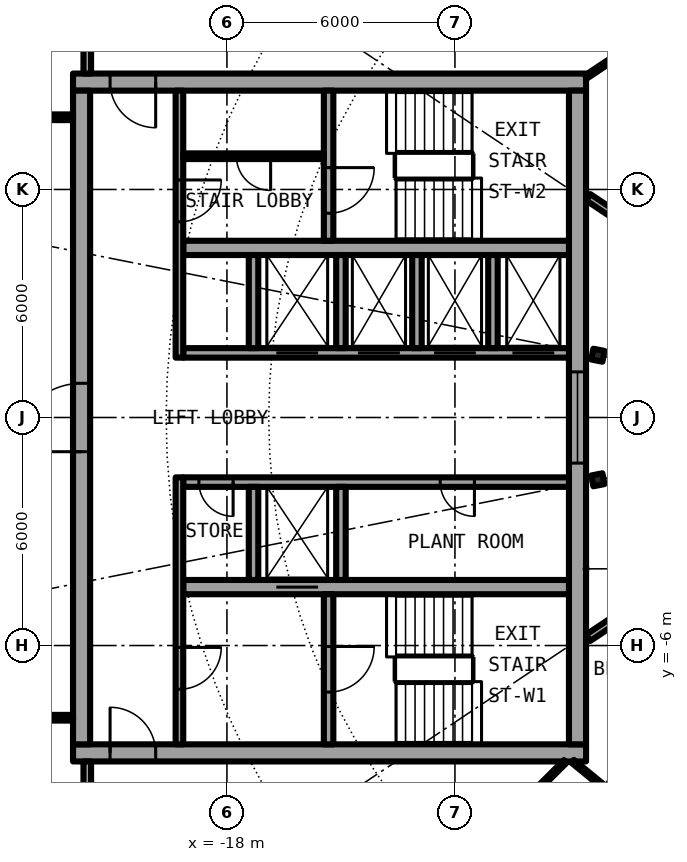
"""IFC4 building model, lengths in metres.
Left out: names, types, materials, properties, quantities, classifications, styles, units other than length and angle.
Written with IfcOpenShell. Run it as: python <this file> out.ifc"""

import sys

from ifc_helpers import new_model, si_unit, direction, frame, frame_2d, origin, origin_2d, place, context, subcontext, project, spatial, rectangle, i_section, extrude, element, fill, save


model = new_model("IFC4")
c1 = context("Model", 3, precision=1e-05, world=origin(), true_north=direction((0.0, 1.0)))
c2 = subcontext(c1, "Body", "Model", "MODEL_VIEW")
j1 = project(units=[si_unit("LENGTHUNIT", "METRE"), si_unit("PLANEANGLEUNIT", "RADIAN")], contexts=[c1])
p1 = place(None, origin())
s1 = spatial("IfcSite", under=j1, at=p1, CompositionType="ELEMENT")
p2 = place(p1, origin())
s2 = spatial("IfcBuilding", under=s1, at=p2, CompositionType="ELEMENT")
p3 = place(p2, frame((0.0, 0.0, 196.3)))
s3 = spatial("IfcBuildingStorey", under=s2, at=p3, CompositionType="ELEMENT", Elevation=196.3)
for number, where, z_axis, x_axis in (
    (1, (-8.239, 1.639, 0.0), (0.0, 0.0, 1.0), (-0.981, 0.195, 0.0)),
    (2, (-8.239, -1.639, 0.0), (0.0, 0.0, 1.0), (-0.981, -0.195, 0.0)),
):
    element("IfcColumn", number, at=place(p3, frame(where, z_axis=z_axis, x_axis=x_axis)), inside=s3, PredefinedType="COLUMN", context=c2, shape_type="SweptSolid", body=[
        extrude(i_section(OverallWidth=0.3, OverallDepth=0.29, WebThickness=0.009, FlangeThickness=0.014, FilletRadius=0.027, at=origin_2d()), origin(), (0.0, 0.0, 1.0), 3.05),
    ])
p4 = place(p3, frame((-22.05, -8.825, 0.0), z_axis=(0.0, 0.0, 1.0), x_axis=(1.0, 0.0, 0.0)))
e3 = element("IfcWall", 3, at=p4, inside=s3, PredefinedType="SHEAR", context=c2, shape_type="SweptSolid", body=[
    extrude(rectangle(XDim=13.5, YDim=0.45, at=frame_2d((6.75, 0.0))), origin(), (0.0, 0.0, 1.0), 3.05),
])
p5 = place(p4, frame((0.975, 0.0, 0.0)))
e4 = element("IfcOpeningElement", 4, at=p5, cuts=e3, PredefinedType="OPENING", context=c2, shape_type="SweptSolid", body=[
    extrude(rectangle(XDim=1.2, YDim=2.3, at=frame_2d((0.6, 1.15))), frame((0.0, 0.235, 0.0), z_axis=(0.0, -1.0, 0.0), x_axis=(1.0, 0.0, 0.0)), (0.0, 0.0, 1.0), 0.47),
])
p6 = place(p3, frame((-8.55, 8.825, 0.0), z_axis=(0.0, 0.0, 1.0), x_axis=(-1.0, 0.0, 0.0)))
e5 = element("IfcWall", 5, at=p6, inside=s3, PredefinedType="SHEAR", context=c2, shape_type="SweptSolid", body=[
    extrude(rectangle(XDim=13.5, YDim=0.45, at=frame_2d((6.75, 0.0))), origin(), (0.0, 0.0, 1.0), 3.05),
])
p7 = place(p6, frame((11.325, 0.0, 0.0)))
e6 = element("IfcOpeningElement", 6, at=p7, cuts=e5, PredefinedType="OPENING", context=c2, shape_type="SweptSolid", body=[
    extrude(rectangle(XDim=1.2, YDim=2.3, at=frame_2d((0.6, 1.15))), frame((0.0, 0.235, 0.0), z_axis=(0.0, -1.0, 0.0), x_axis=(1.0, 0.0, 0.0)), (0.0, 0.0, 1.0), 0.47),
])
p8 = place(p3, frame((-21.825, -8.6, 0.0), z_axis=(0.0, 0.0, 1.0), x_axis=(0.0, 1.0, 0.0)))
e7 = element("IfcWall", 7, at=p8, inside=s3, PredefinedType="SHEAR", context=c2, shape_type="SweptSolid", body=[
    extrude(rectangle(XDim=17.2, YDim=0.45, at=frame_2d((8.6, 0.0))), origin(), (0.0, 0.0, 1.0), 3.05),
])
p9 = place(p8, frame((7.7, 0.0, 0.0)))
e8 = element("IfcOpeningElement", 8, at=p9, cuts=e7, PredefinedType="OPENING", context=c2, shape_type="SweptSolid", body=[
    extrude(rectangle(XDim=1.8, YDim=2.3, at=frame_2d((0.9, 1.15))), frame((0.0, 0.235, 0.0), z_axis=(0.0, -1.0, 0.0), x_axis=(1.0, 0.0, 0.0)), (0.0, 0.0, 1.0), 0.47),
])
p10 = place(p3, frame((-8.775, 8.6, 0.0), z_axis=(0.0, 0.0, 1.0), x_axis=(0.0, -1.0, 0.0)))
e9 = element("IfcWall", 9, at=p10, inside=s3, PredefinedType="SHEAR", context=c2, shape_type="SweptSolid", body=[
    extrude(rectangle(XDim=17.2, YDim=0.45, at=frame_2d((8.6, 0.0))), origin(), (0.0, 0.0, 1.0), 3.05),
])
p11 = place(p10, frame((7.4, 0.0, 0.1)))
e10 = element("IfcOpeningElement", 10, at=p11, cuts=e9, PredefinedType="OPENING", context=c2, shape_type="SweptSolid", body=[
    extrude(rectangle(XDim=2.4, YDim=2.2, at=frame_2d((1.2, 1.1))), frame((0.0, 0.235, 0.0), z_axis=(0.0, -1.0, 0.0), x_axis=(1.0, 0.0, 0.0)), (0.0, 0.0, 1.0), 0.47),
])
p12 = place(p3, frame((-9.0, -1.7, 0.0), z_axis=(0.0, 0.0, 1.0), x_axis=(-1.0, 0.0, 0.0)))
e11 = element("IfcWall", 11, at=p12, inside=s3, PredefinedType="SHEAR", context=c2, shape_type="SweptSolid", body=[
    extrude(rectangle(XDim=10.15, YDim=0.25, at=frame_2d((5.075, 0.0))), origin(), (0.0, 0.0, 1.0), 3.05),
])
p13 = place(p12, frame((2.488, 0.0, 0.0)))
e12 = element("IfcOpeningElement", 12, at=p13, cuts=e11, PredefinedType="OPENING", context=c2, shape_type="SweptSolid", body=[
    extrude(rectangle(XDim=0.9, YDim=2.3, at=frame_2d((0.45, 1.15))), frame((0.0, 0.135, 0.0), z_axis=(0.0, -1.0, 0.0), x_axis=(1.0, 0.0, 0.0)), (0.0, 0.0, 1.0), 0.27),
])
p14 = place(p12, frame((8.837, 0.0, 0.0)))
e13 = element("IfcOpeningElement", 13, at=p14, cuts=e11, PredefinedType="OPENING", context=c2, shape_type="SweptSolid", body=[
    extrude(rectangle(XDim=0.9, YDim=2.3, at=frame_2d((0.45, 1.15))), frame((0.0, 0.135, 0.0), z_axis=(0.0, -1.0, 0.0), x_axis=(1.0, 0.0, 0.0)), (0.0, 0.0, 1.0), 0.27),
])
p15 = place(p3, frame((-9.0, -4.462, 0.0), z_axis=(0.0, 0.0, 1.0), x_axis=(-1.0, 0.0, 0.0)))
e14 = element("IfcWall", 14, at=p15, inside=s3, PredefinedType="SHEAR", context=c2, shape_type="SweptSolid", body=[
    extrude(rectangle(XDim=10.15, YDim=0.375, at=frame_2d((5.075, 0.0))), origin(), (0.0, 0.0, 1.0), 3.05),
])
p16 = place(p15, frame((6.6, 0.0, 0.0)))
e15 = element("IfcOpeningElement", 15, at=p16, cuts=e14, PredefinedType="OPENING", context=c2, shape_type="SweptSolid", body=[
    extrude(rectangle(XDim=1.1, YDim=2.3, at=frame_2d((0.55, 1.15))), frame((0.0, 0.198, 0.0), z_axis=(0.0, -1.0, 0.0), x_axis=(1.0, 0.0, 0.0)), (0.0, 0.0, 1.0), 0.395),
])
p17 = place(p3, frame((-15.325, -4.65, 0.0), z_axis=(0.0, 0.0, 1.0), x_axis=(0.0, -1.0, 0.0)))
e16 = element("IfcWall", 16, at=p17, inside=s3, PredefinedType="SHEAR", context=c2, shape_type="SweptSolid", body=[
    extrude(rectangle(XDim=3.95, YDim=0.25, at=frame_2d((1.975, 0.0))), origin(), (0.0, 0.0, 1.0), 3.05),
])
p18 = place(p17, frame((1.375, 0.0, 0.0)))
e17 = element("IfcOpeningElement", 17, at=p18, cuts=e16, PredefinedType="OPENING", context=c2, shape_type="SweptSolid", body=[
    extrude(rectangle(XDim=1.2, YDim=2.3, at=frame_2d((0.6, 1.15))), frame((0.0, 0.135, 0.0), z_axis=(0.0, -1.0, 0.0), x_axis=(1.0, 0.0, 0.0)), (0.0, 0.0, 1.0), 0.27),
])
for number, where, z_axis, x_axis in (
    (18, (-15.0, -1.825, 0.0), (0.0, 0.0, 1.0), (0.0, -1.0, 0.0)),
    (19, (-17.3, -1.825, 0.0), (0.0, 0.0, 1.0), (0.0, -1.0, 0.0)),
):
    element("IfcWall", number, at=place(p3, frame(where, z_axis=z_axis, x_axis=x_axis)), inside=s3, PredefinedType="SOLIDWALL", context=c2, shape_type="SweptSolid", body=[
        extrude(rectangle(XDim=2.45, YDim=0.25, at=frame_2d((1.225, 0.0))), origin(), (0.0, 0.0, 1.0), 2.7),
    ])
p19 = place(p3, frame((-19.25, -1.575, 0.0), z_axis=(0.0, 0.0, 1.0), x_axis=(0.0, -1.0, 0.0)))
e20 = element("IfcWall", 20, at=p19, inside=s3, PredefinedType="SOLIDWALL", context=c2, shape_type="SweptSolid", body=[
    extrude(rectangle(XDim=7.025, YDim=0.2, at=frame_2d((3.513, 0.0))), origin(), (0.0, 0.0, 1.0), 2.7),
])
p20 = place(p19, frame((4.475, 0.0, 0.0)))
e21 = element("IfcOpeningElement", 21, at=p20, cuts=e20, PredefinedType="OPENING", context=c2, shape_type="SweptSolid", body=[
    extrude(rectangle(XDim=1.1, YDim=2.3, at=frame_2d((0.55, 1.15))), frame((0.0, 0.11, 0.0), z_axis=(0.0, -1.0, 0.0), x_axis=(1.0, 0.0, 0.0)), (0.0, 0.0, 1.0), 0.22),
])
p21 = place(p3, frame((-9.0, 1.7, 0.0), z_axis=(0.0, 0.0, 1.0), x_axis=(-1.0, 0.0, 0.0)))
e22 = element("IfcWall", 22, at=p21, inside=s3, PredefinedType="SHEAR", context=c2, shape_type="SweptSolid", body=[
    extrude(rectangle(XDim=10.15, YDim=0.25, at=frame_2d((5.075, 0.0))), origin(), (0.0, 0.0, 1.0), 3.05),
])
p22 = place(p21, frame((0.387, 0.0, 0.0)))
e23 = element("IfcOpeningElement", 23, at=p22, cuts=e22, PredefinedType="OPENING", context=c2, shape_type="SweptSolid", body=[
    extrude(rectangle(XDim=1.1, YDim=2.3, at=frame_2d((0.55, 1.15))), frame((0.0, 0.135, 0.0), z_axis=(0.0, -1.0, 0.0), x_axis=(1.0, 0.0, 0.0)), (0.0, 0.0, 1.0), 0.27),
])
p23 = place(p21, frame((2.45, 0.0, 0.0)))
e24 = element("IfcOpeningElement", 24, at=p23, cuts=e22, PredefinedType="OPENING", context=c2, shape_type="SweptSolid", body=[
    extrude(rectangle(XDim=1.1, YDim=2.3, at=frame_2d((0.55, 1.15))), frame((0.0, 0.135, 0.0), z_axis=(0.0, -1.0, 0.0), x_axis=(1.0, 0.0, 0.0)), (0.0, 0.0, 1.0), 0.27),
])
p24 = place(p21, frame((4.45, 0.0, 0.0)))
e25 = element("IfcOpeningElement", 25, at=p24, cuts=e22, PredefinedType="OPENING", context=c2, shape_type="SweptSolid", body=[
    extrude(rectangle(XDim=1.1, YDim=2.3, at=frame_2d((0.55, 1.15))), frame((0.0, 0.135, 0.0), z_axis=(0.0, -1.0, 0.0), x_axis=(1.0, 0.0, 0.0)), (0.0, 0.0, 1.0), 0.27),
])
p25 = place(p21, frame((6.6, 0.0, 0.0)))
e26 = element("IfcOpeningElement", 26, at=p25, cuts=e22, PredefinedType="OPENING", context=c2, shape_type="SweptSolid", body=[
    extrude(rectangle(XDim=1.1, YDim=2.3, at=frame_2d((0.55, 1.15))), frame((0.0, 0.135, 0.0), z_axis=(0.0, -1.0, 0.0), x_axis=(1.0, 0.0, 0.0)), (0.0, 0.0, 1.0), 0.27),
])
p26 = place(p3, frame((-9.0, 4.462, 0.0), z_axis=(0.0, 0.0, 1.0), x_axis=(-1.0, 0.0, 0.0)))
e27 = element("IfcWall", 27, at=p26, inside=s3, PredefinedType="SHEAR", context=c2, shape_type="SweptSolid", body=[
    extrude(rectangle(XDim=10.15, YDim=0.375, at=frame_2d((5.075, 0.0))), origin(), (0.0, 0.0, 1.0), 3.05),
])
p27 = place(p3, frame((-15.325, 8.6, 0.0), z_axis=(0.0, 0.0, 1.0), x_axis=(0.0, -1.0, 0.0)))
e28 = element("IfcWall", 28, at=p27, inside=s3, PredefinedType="SHEAR", context=c2, shape_type="SweptSolid", body=[
    extrude(rectangle(XDim=3.95, YDim=0.25, at=frame_2d((1.975, 0.0))), origin(), (0.0, 0.0, 1.0), 3.05),
])
p28 = place(p27, frame((2.025, 0.0, 0.0)))
e29 = element("IfcOpeningElement", 29, at=p28, cuts=e28, PredefinedType="OPENING", context=c2, shape_type="SweptSolid", body=[
    extrude(rectangle(XDim=1.2, YDim=2.3, at=frame_2d((0.6, 1.15))), frame((0.0, 0.135, 0.0), z_axis=(0.0, -1.0, 0.0), x_axis=(1.0, 0.0, 0.0)), (0.0, 0.0, 1.0), 0.27),
])
for number, where, z_axis, x_axis in (
    (30, (-15.0, 1.825, 0.0), (0.0, 0.0, 1.0), (0.0, 1.0, 0.0)),
    (31, (-17.3, 1.825, 0.0), (0.0, 0.0, 1.0), (0.0, 1.0, 0.0)),
):
    element("IfcWall", number, at=place(p3, frame(where, z_axis=z_axis, x_axis=x_axis)), inside=s3, PredefinedType="SOLIDWALL", context=c2, shape_type="SweptSolid", body=[
        extrude(rectangle(XDim=2.45, YDim=0.25, at=frame_2d((1.225, 0.0))), origin(), (0.0, 0.0, 1.0), 2.7),
    ])
p29 = place(p3, frame((-19.25, 8.6, 0.0), z_axis=(0.0, 0.0, 1.0), x_axis=(0.0, -1.0, 0.0)))
e32 = element("IfcWall", 32, at=p29, inside=s3, PredefinedType="SOLIDWALL", context=c2, shape_type="SweptSolid", body=[
    extrude(rectangle(XDim=7.025, YDim=0.2, at=frame_2d((3.513, 0.0))), origin(), (0.0, 0.0, 1.0), 2.7),
])
p30 = place(p29, frame((2.35, 0.0, 0.0)))
e33 = element("IfcOpeningElement", 33, at=p30, cuts=e32, PredefinedType="OPENING", context=c2, shape_type="SweptSolid", body=[
    extrude(rectangle(XDim=1.1, YDim=2.3, at=frame_2d((0.55, 1.15))), frame((0.0, 0.11, 0.0), z_axis=(0.0, -1.0, 0.0), x_axis=(1.0, 0.0, 0.0)), (0.0, 0.0, 1.0), 0.22),
])
for number, where, z_axis, x_axis in (
    (34, (-11.0, 1.825, 0.0), (0.0, 0.0, 1.0), (0.0, 1.0, 0.0)),
    (35, (-13.0, 1.825, 0.0), (0.0, 0.0, 1.0), (0.0, 1.0, 0.0)),
):
    element("IfcWall", number, at=place(p3, frame(where, z_axis=z_axis, x_axis=x_axis)), inside=s3, PredefinedType="SOLIDWALL", context=c2, shape_type="SweptSolid", body=[
        extrude(rectangle(XDim=2.45, YDim=0.25, at=frame_2d((1.225, 0.0))), origin(), (0.0, 0.0, 1.0), 2.7),
    ])
p31 = place(p3, frame((-15.45, 6.875, 0.0), z_axis=(0.0, 0.0, 1.0), x_axis=(-1.0, 0.0, 0.0)))
e36 = element("IfcWall", 36, at=p31, inside=s3, PredefinedType="PARTITIONING", context=c2, shape_type="SweptSolid", body=[
    extrude(rectangle(XDim=3.7, YDim=0.15, at=frame_2d((1.85, 0.0))), origin(), (0.0, 0.0, 1.0), 2.7),
])
p32 = place(p31, frame((1.4, 0.0, 0.0)))
e37 = element("IfcOpeningElement", 37, at=p32, cuts=e36, PredefinedType="OPENING", context=c2, shape_type="SweptSolid", body=[
    extrude(rectangle(XDim=0.9, YDim=2.3, at=frame_2d((0.45, 1.15))), frame((0.0, 0.085, 0.0), z_axis=(0.0, -1.0, 0.0), x_axis=(1.0, 0.0, 0.0)), (0.0, 0.0, 1.0), 0.17),
])
for number, where, z_axis, x_axis in (
    (38, (-22.05, 7.9, 0.0), (0.0, 0.0, 1.0), (-1.0, 0.0, 0.0)),
    (39, (-22.05, -7.9, 0.0), (0.0, 0.0, 1.0), (-1.0, 0.0, 0.0)),
):
    element("IfcWall", number, at=place(p3, frame(where, z_axis=z_axis, x_axis=x_axis)), inside=s3, PredefinedType="PARTITIONING", context=c2, shape_type="SweptSolid", body=[
        extrude(rectangle(XDim=2.89, YDim=0.15, at=frame_2d((1.445, 0.0))), origin(), (0.0, 0.0, 1.0), 2.7),
    ])
p33 = place(p3, frame((-8.901, -9.047, 0.0), z_axis=(0.0, 0.0, 1.0), x_axis=(0.772786083133, -0.634666581534, 0.0)))
e40 = element("IfcWall", 40, at=p33, inside=s3, PredefinedType="PARTITIONING", context=c2, shape_type="SweptSolid", body=[
    extrude(rectangle(XDim=1.144, YDim=0.1, at=frame_2d((0.572, 0.0))), origin(), (0.0, 0.0, 1.0), 2.7),
])
p34 = place(p3, frame((-6.513, -4.472, 0.0), z_axis=(0.0, 0.0, 1.0), x_axis=(-0.831403409976, -0.555669299026, 0.0)))
e41 = element("IfcWall", 41, at=p34, inside=s3, PredefinedType="PARTITIONING", context=c2, shape_type="SweptSolid", body=[
    extrude(rectangle(XDim=2.383, YDim=0.2, at=frame_2d((1.191, 0.0))), origin(), (0.0, 0.0, 1.0), 2.7),
])
p35 = place(p3, frame((-12.069, -12.007, 0.0), z_axis=(0.0, 0.0, 1.0), x_axis=(0.708909651863, 0.705299302067, 0.0)))
e42 = element("IfcWall", 42, at=p35, inside=s3, PredefinedType="PARTITIONING", context=c2, shape_type="SweptSolid", body=[
    extrude(rectangle(XDim=4.193, YDim=0.1, at=frame_2d((2.096, 0.0))), origin(), (0.0, 0.0, 1.0), 2.7),
])
p36 = place(p35, frame((1.646, 0.0, 0.0)))
e43 = element("IfcOpeningElement", 43, at=p36, cuts=e42, PredefinedType="OPENING", context=c2, shape_type="SweptSolid", body=[
    extrude(rectangle(XDim=0.9, YDim=2.3, at=frame_2d((0.45, 1.15))), frame((0.0, 0.06, 0.0), z_axis=(0.0, -1.0, 0.0), x_axis=(1.0, 0.0, 0.0)), (0.0, 0.0, 1.0), 0.12),
])
p37 = place(p3, frame((-8.019, -9.771, 0.0), z_axis=(0.0, 0.0, 1.0), x_axis=(0.634401778971, 0.773003481776, 0.0)))
e44 = element("IfcWall", 44, at=p37, inside=s3, PredefinedType="PARTITIONING", context=c2, shape_type="SweptSolid", body=[
    extrude(rectangle(XDim=4.92, YDim=0.1, at=frame_2d((2.46, 0.0))), origin(), (0.0, 0.0, 1.0), 2.7),
])
p38 = place(p37, frame((2.01, 0.0, 0.0)))
e45 = element("IfcOpeningElement", 45, at=p38, cuts=e44, PredefinedType="OPENING", context=c2, shape_type="SweptSolid", body=[
    extrude(rectangle(XDim=0.9, YDim=2.3, at=frame_2d((0.45, 1.15))), frame((0.0, 0.06, 0.0), z_axis=(0.0, -1.0, 0.0), x_axis=(1.0, 0.0, 0.0)), (0.0, 0.0, 1.0), 0.12),
])
p39 = place(p3, frame((-6.513, 4.472, 0.0), z_axis=(0.0, 0.0, 1.0), x_axis=(-0.831403409976, 0.555669299026, 0.0)))
e46 = element("IfcWall", 46, at=p39, inside=s3, PredefinedType="PARTITIONING", context=c2, shape_type="SweptSolid", body=[
    extrude(rectangle(XDim=2.383, YDim=0.2, at=frame_2d((1.191, 0.0))), origin(), (0.0, 0.0, 1.0), 2.7),
])
p40 = place(p3, frame((-8.55, 8.963, 0.0), z_axis=(0.0, 0.0, 1.0), x_axis=(0.83129689803, 0.555828631257, 0.0)))
e47 = element("IfcWall", 47, at=p40, inside=s3, PredefinedType="PARTITIONING", context=c2, shape_type="SweptSolid", body=[
    extrude(rectangle(XDim=3.394, YDim=0.1, at=frame_2d((1.697, 0.0))), origin(), (0.0, 0.0, 1.0), 2.7),
])
for number, where, z_axis, x_axis in (
    (48, (-21.675, -10.825, 0.0), (0.0, 0.0, 1.0), (0.0, 1.0, 0.0)),
    (49, (-21.675, 9.05, 0.0), (0.0, 0.0, 1.0), (0.0, 1.0, 0.0)),
):
    element("IfcWall", number, at=place(p3, frame(where, z_axis=z_axis, x_axis=x_axis)), inside=s3, PredefinedType="PARTITIONING", context=c2, shape_type="SweptSolid", body=[
        extrude(rectangle(XDim=1.775, YDim=0.2, at=frame_2d((0.887, 0.0))), origin(), (0.0, 0.0, 1.0), 2.7),
    ])
p41 = place(p16, origin())
e50 = element("IfcDoor", 50, at=p41, inside=s3, OperationType="DOUBLE_DOOR_SLIDING", PredefinedType="DOOR", context=c2, shape_type="SweptSolid", body=[
    extrude(rectangle(XDim=1.1, YDim=2.3, at=frame_2d((0.55, 1.15))), frame((0.0, 0.025, 0.0), z_axis=(0.0, -1.0, 0.0), x_axis=(1.0, 0.0, 0.0)), (0.0, 0.0, 1.0), 0.05),
])
fill(e15, e50)
p42 = place(p22, origin())
e51 = element("IfcDoor", 51, at=p42, inside=s3, OperationType="DOUBLE_DOOR_SLIDING", PredefinedType="DOOR", context=c2, shape_type="SweptSolid", body=[
    extrude(rectangle(XDim=1.1, YDim=2.3, at=frame_2d((0.55, 1.15))), frame((0.0, 0.025, 0.0), z_axis=(0.0, -1.0, 0.0), x_axis=(1.0, 0.0, 0.0)), (0.0, 0.0, 1.0), 0.05),
])
fill(e23, e51)
p43 = place(p23, origin())
e52 = element("IfcDoor", 52, at=p43, inside=s3, OperationType="DOUBLE_DOOR_SLIDING", PredefinedType="DOOR", context=c2, shape_type="SweptSolid", body=[
    extrude(rectangle(XDim=1.1, YDim=2.3, at=frame_2d((0.55, 1.15))), frame((0.0, 0.025, 0.0), z_axis=(0.0, -1.0, 0.0), x_axis=(1.0, 0.0, 0.0)), (0.0, 0.0, 1.0), 0.05),
])
fill(e24, e52)
p44 = place(p24, origin())
e53 = element("IfcDoor", 53, at=p44, inside=s3, OperationType="DOUBLE_DOOR_SLIDING", PredefinedType="DOOR", context=c2, shape_type="SweptSolid", body=[
    extrude(rectangle(XDim=1.1, YDim=2.3, at=frame_2d((0.55, 1.15))), frame((0.0, 0.025, 0.0), z_axis=(0.0, -1.0, 0.0), x_axis=(1.0, 0.0, 0.0)), (0.0, 0.0, 1.0), 0.05),
])
fill(e25, e53)
p45 = place(p25, origin())
e54 = element("IfcDoor", 54, at=p45, inside=s3, OperationType="DOUBLE_DOOR_SLIDING", PredefinedType="DOOR", context=c2, shape_type="SweptSolid", body=[
    extrude(rectangle(XDim=1.1, YDim=2.3, at=frame_2d((0.55, 1.15))), frame((0.0, 0.025, 0.0), z_axis=(0.0, -1.0, 0.0), x_axis=(1.0, 0.0, 0.0)), (0.0, 0.0, 1.0), 0.05),
])
fill(e26, e54)
p46 = place(p13, origin())
e55 = element("IfcDoor", 55, at=p46, inside=s3, OperationType="SINGLE_SWING_RIGHT", PredefinedType="DOOR", context=c2, shape_type="SweptSolid", body=[
    extrude(rectangle(XDim=0.9, YDim=2.3, at=frame_2d((0.45, 1.15))), frame((0.0, 0.025, 0.0), z_axis=(0.0, -1.0, 0.0), x_axis=(1.0, 0.0, 0.0)), (0.0, 0.0, 1.0), 0.05),
])
fill(e12, e55)
p47 = place(p14, origin())
e56 = element("IfcDoor", 56, at=p47, inside=s3, OperationType="SINGLE_SWING_LEFT", PredefinedType="DOOR", context=c2, shape_type="SweptSolid", body=[
    extrude(rectangle(XDim=0.9, YDim=2.3, at=frame_2d((0.45, 1.15))), frame((0.0, 0.025, 0.0), z_axis=(0.0, -1.0, 0.0), x_axis=(1.0, 0.0, 0.0)), (0.0, 0.0, 1.0), 0.05),
])
fill(e13, e56)
p48 = place(p32, origin())
e57 = element("IfcDoor", 57, at=p48, inside=s3, OperationType="SINGLE_SWING_LEFT", PredefinedType="DOOR", context=c2, shape_type="SweptSolid", body=[
    extrude(rectangle(XDim=0.9, YDim=2.3, at=frame_2d((0.45, 1.15))), frame((0.0, 0.025, 0.0), z_axis=(0.0, -1.0, 0.0), x_axis=(1.0, 0.0, 0.0)), (0.0, 0.0, 1.0), 0.05),
])
fill(e37, e57)
p49 = place(p18, origin())
e58 = element("IfcDoor", 58, at=p49, inside=s3, OperationType="SINGLE_SWING_LEFT", PredefinedType="DOOR", context=c2, shape_type="SweptSolid", body=[
    extrude(rectangle(XDim=1.2, YDim=2.3, at=frame_2d((0.6, 1.15))), frame((0.0, 0.025, 0.0), z_axis=(0.0, -1.0, 0.0), x_axis=(1.0, 0.0, 0.0)), (0.0, 0.0, 1.0), 0.05),
])
fill(e17, e58)
p50 = place(p28, origin())
e59 = element("IfcDoor", 59, at=p50, inside=s3, OperationType="SINGLE_SWING_LEFT", PredefinedType="DOOR", context=c2, shape_type="SweptSolid", body=[
    extrude(rectangle(XDim=1.2, YDim=2.3, at=frame_2d((0.6, 1.15))), frame((0.0, 0.025, 0.0), z_axis=(0.0, -1.0, 0.0), x_axis=(1.0, 0.0, 0.0)), (0.0, 0.0, 1.0), 0.05),
])
fill(e29, e59)
p51 = place(p20, origin())
e60 = element("IfcDoor", 60, at=p51, inside=s3, OperationType="SINGLE_SWING_LEFT", PredefinedType="DOOR", context=c2, shape_type="SweptSolid", body=[
    extrude(rectangle(XDim=1.1, YDim=2.3, at=frame_2d((0.55, 1.15))), frame((0.0, 0.025, 0.0), z_axis=(0.0, -1.0, 0.0), x_axis=(1.0, 0.0, 0.0)), (0.0, 0.0, 1.0), 0.05),
])
fill(e21, e60)
p52 = place(p30, origin())
e61 = element("IfcDoor", 61, at=p52, inside=s3, OperationType="SINGLE_SWING_RIGHT", PredefinedType="DOOR", context=c2, shape_type="SweptSolid", body=[
    extrude(rectangle(XDim=1.1, YDim=2.3, at=frame_2d((0.55, 1.15))), frame((0.0, 0.025, 0.0), z_axis=(0.0, -1.0, 0.0), x_axis=(1.0, 0.0, 0.0)), (0.0, 0.0, 1.0), 0.05),
])
fill(e33, e61)
p53 = place(p5, origin())
e62 = element("IfcDoor", 62, at=p53, inside=s3, OperationType="SINGLE_SWING_RIGHT", PredefinedType="DOOR", context=c2, shape_type="SweptSolid", body=[
    extrude(rectangle(XDim=1.2, YDim=2.3, at=frame_2d((0.6, 1.15))), frame((0.0, 0.025, 0.0), z_axis=(0.0, -1.0, 0.0), x_axis=(1.0, 0.0, 0.0)), (0.0, 0.0, 1.0), 0.05),
])
fill(e4, e62)
p54 = place(p7, origin())
e63 = element("IfcDoor", 63, at=p54, inside=s3, OperationType="SINGLE_SWING_LEFT", PredefinedType="DOOR", context=c2, shape_type="SweptSolid", body=[
    extrude(rectangle(XDim=1.2, YDim=2.3, at=frame_2d((0.6, 1.15))), frame((0.0, 0.025, 0.0), z_axis=(0.0, -1.0, 0.0), x_axis=(1.0, 0.0, 0.0)), (0.0, 0.0, 1.0), 0.05),
])
fill(e6, e63)
p55 = place(p9, origin())
e64 = element("IfcDoor", 64, at=p55, inside=s3, OperationType="SINGLE_SWING_LEFT", PredefinedType="DOOR", context=c2, shape_type="SweptSolid", body=[
    extrude(rectangle(XDim=1.8, YDim=2.3, at=frame_2d((0.9, 1.15))), frame((0.0, 0.025, 0.0), z_axis=(0.0, -1.0, 0.0), x_axis=(1.0, 0.0, 0.0)), (0.0, 0.0, 1.0), 0.05),
])
fill(e8, e64)
p56 = place(p11, origin())
e65 = element("IfcWindow", 65, at=p56, inside=s3, PartitioningType="SINGLE_PANEL", PredefinedType="WINDOW", context=c2, shape_type="SweptSolid", body=[
    extrude(rectangle(XDim=2.4, YDim=2.2, at=frame_2d((1.2, 1.1))), frame((0.0, 0.03, 0.0), z_axis=(0.0, -1.0, 0.0), x_axis=(1.0, 0.0, 0.0)), (0.0, 0.0, 1.0), 0.06),
])
fill(e10, e65)
save(model, sys.argv[1])
